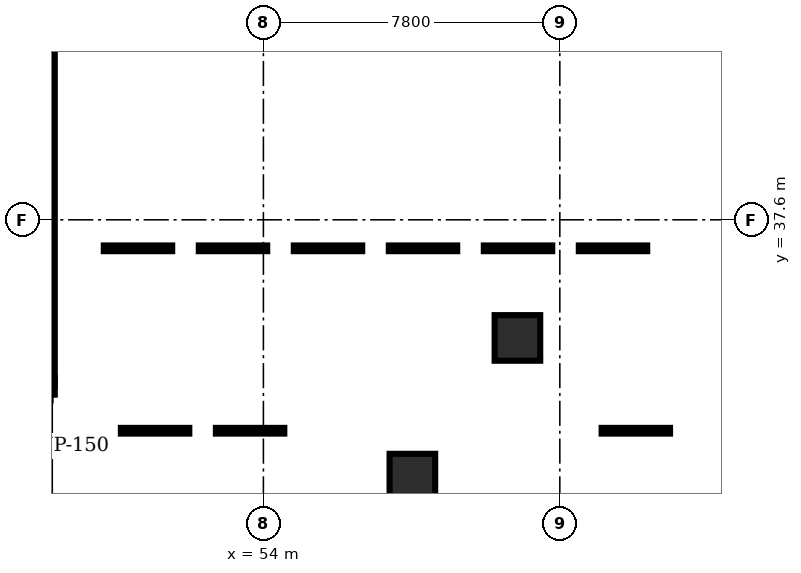
"""IFC4 building model, lengths in metres.
Left out: names, types, materials, properties, quantities, classifications, styles, units other than length and angle.
Written with IfcOpenShell. Run it as: python <this file> out.ifc"""

import sys

from ifc_helpers import new_model, si_unit, direction, frame, frame_2d, origin, origin_2d, place, context, subcontext, project, spatial, rectangle, hollow_rectangle, extrude, element, save


model = new_model("IFC4")
c1 = context("Model", 3, precision=1e-05, world=origin(), true_north=direction((0.0, 1.0)))
c2 = subcontext(c1, "Body", "Model", "MODEL_VIEW")
j1 = project(units=[si_unit("LENGTHUNIT", "METRE"), si_unit("PLANEANGLEUNIT", "RADIAN")], contexts=[c1])
p1 = place(None, origin())
s1 = spatial("IfcSite", under=j1, at=p1, CompositionType="ELEMENT")
p2 = place(p1, origin())
s2 = spatial("IfcBuilding", under=s1, at=p2, CompositionType="ELEMENT")
p3 = place(p2, frame((0.0, 0.0, -8.16)))
s3 = spatial("IfcBuildingStorey", under=s2, at=p3, CompositionType="ELEMENT", Elevation=-8.16)
p4 = place(p3, frame((28.4, 33.225, 0.0), z_axis=(0.0, 0.0, 1.0), x_axis=(1.0, 0.0, 0.0)))
e1 = element("IfcWall", 1, at=p4, inside=s3, PredefinedType="SHEAR", context=c2, shape_type="SweptSolid", body=[
    extrude(rectangle(XDim=20.11, YDim=0.45, at=frame_2d((10.055, 0.0))), origin(), (0.0, 0.0, 1.0), 3.76),
])
p5 = place(p4, frame((4.03, 0.0, 0.0)))
e2 = element("IfcOpeningElement", 2, at=p5, cuts=e1, PredefinedType="OPENING", context=c2, shape_type="SweptSolid", body=[
    extrude(rectangle(XDim=1.1, YDim=2.15, at=frame_2d((0.55, 1.075))), frame((0.0, 0.235, 0.0), z_axis=(0.0, -1.0, 0.0), x_axis=(1.0, 0.0, 0.0)), (0.0, 0.0, 1.0), 0.47),
])
p6 = place(p4, frame((14.87, 0.0, 0.0)))
e3 = element("IfcOpeningElement", 3, at=p6, cuts=e1, PredefinedType="OPENING", context=c2, shape_type="SweptSolid", body=[
    extrude(rectangle(XDim=1.1, YDim=2.15, at=frame_2d((0.55, 1.075))), frame((0.0, 0.235, 0.0), z_axis=(0.0, -1.0, 0.0), x_axis=(1.0, 0.0, 0.0)), (0.0, 0.0, 1.0), 0.47),
])
p7 = place(p4, frame((1.31, 0.0, 0.0)))
e4 = element("IfcOpeningElement", 4, at=p7, cuts=e1, PredefinedType="OPENING", context=c2, shape_type="SweptSolid", body=[
    extrude(rectangle(XDim=1.1, YDim=2.2, at=frame_2d((0.55, 1.1))), frame((0.0, 0.235, 0.0), z_axis=(0.0, -1.0, 0.0), x_axis=(1.0, 0.0, 0.0)), (0.0, 0.0, 1.0), 0.47),
])
p8 = place(p4, frame((9.44, 0.0, 0.0)))
e5 = element("IfcOpeningElement", 5, at=p8, cuts=e1, PredefinedType="OPENING", context=c2, shape_type="SweptSolid", body=[
    extrude(rectangle(XDim=1.12, YDim=2.05, at=frame_2d((0.56, 1.025))), frame((0.0, 0.235, 0.0), z_axis=(0.0, -1.0, 0.0), x_axis=(1.0, 0.0, 0.0)), (0.0, 0.0, 1.0), 0.47),
])
p9 = place(p4, frame((17.65, 0.0, 0.0)))
e6 = element("IfcOpeningElement", 6, at=p9, cuts=e1, PredefinedType="OPENING", context=c2, shape_type="SweptSolid", body=[
    extrude(rectangle(XDim=1.1, YDim=2.2, at=frame_2d((0.55, 1.1))), frame((0.0, 0.235, 0.0), z_axis=(0.0, -1.0, 0.0), x_axis=(1.0, 0.0, 0.0)), (0.0, 0.0, 1.0), 0.47),
])
p10 = place(p3, frame((48.285, 33.225, 0.0), z_axis=(0.0, 0.0, 1.0), x_axis=(0.0, 1.0, 0.0)))
e7 = element("IfcWall", 7, at=p10, inside=s3, PredefinedType="SHEAR", context=c2, shape_type="SweptSolid", body=[
    extrude(rectangle(XDim=10.25, YDim=0.45, at=frame_2d((5.125, 0.0))), origin(), (0.0, 0.0, 1.0), 3.76),
])
for number, where, z_axis, x_axis in (
    (8, (57.92, 30.843, 0.0), (0.0, 0.0, 1.0), (1.0, 0.0, 0.0)),
    (9, (60.685, 34.492, 0.0), (0.0, 0.0, 1.0), (1.0, 0.0, 0.0)),
):
    element("IfcColumn", number, at=place(p3, frame(where, z_axis=z_axis, x_axis=x_axis)), inside=s3, PredefinedType="COLUMN", context=c2, shape_type="SweptSolid", body=[
        extrude(hollow_rectangle(XDim=1.2, YDim=1.2, WallThickness=0.06, at=origin_2d()), origin(), (0.0, 0.0, 1.0), 3.76),
    ])
save(model, sys.argv[1])
